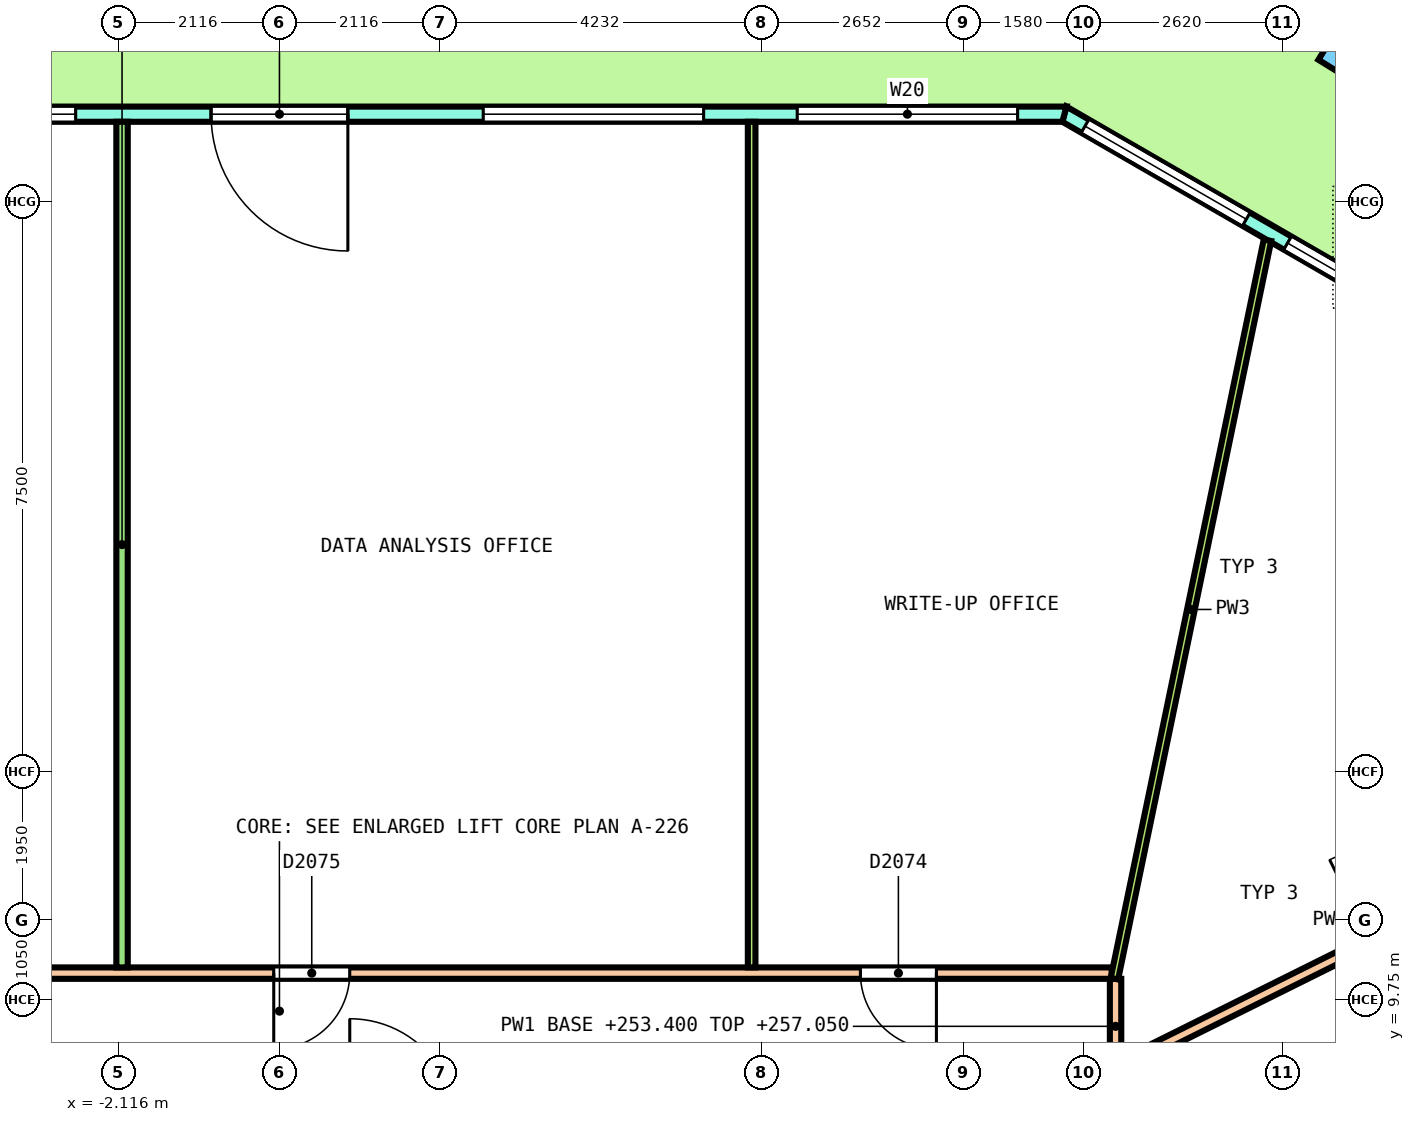
"""IFC4 building model, lengths in metres.
Left out: names, types, materials, properties, quantities, classifications, styles, units other than length and angle.
Written with IfcOpenShell. Run it as: python <this file> out.ifc"""

import sys

from ifc_helpers import new_model, si_unit, direction, frame, frame_2d, origin, origin_2d, place, context, subcontext, project, spatial, polyline, rectangle, outline, extrude, element, fill, save


model = new_model("IFC4")
c1 = context("Model", 3, precision=1e-05, world=origin(), true_north=direction((0.0, 1.0)))
c2 = subcontext(c1, "Body", "Model", "MODEL_VIEW")
j1 = project(units=[si_unit("LENGTHUNIT", "METRE"), si_unit("PLANEANGLEUNIT", "RADIAN")], contexts=[c1])
p1 = place(None, origin())
s1 = spatial("IfcSite", under=j1, at=p1, CompositionType="ELEMENT")
p2 = place(p1, origin())
s2 = spatial("IfcBuilding", under=s1, at=p2, CompositionType="ELEMENT")
p3 = place(p2, frame((0.0, 0.0, 253.4)))
s3 = spatial("IfcBuildingStorey", under=s2, at=p3, CompositionType="ELEMENT", Elevation=253.4)
p4 = place(p3, frame((14.391, 22.287, 0.0), z_axis=(-0.356050057994, 0.0, 0.934466883417), x_axis=(-0.794974235291, 0.525611228878, -0.302900645922)))
e1 = element("IfcColumn", 1, at=p4, inside=s3, PredefinedType="COLUMN", context=c2, shape_type="SweptSolid", body=[
    extrude(rectangle(XDim=1.05, YDim=1.05, at=origin_2d()), origin(), (0.0, 0.0, 1.0), 3.896),
])
p5 = place(p3, frame((15.656, 18.323, 0.0), z_axis=(0.0, 0.0, 1.0), x_axis=(-0.866029647142, 0.499992650217, 0.0)))
e2 = element("IfcWall", 2, at=p5, inside=s3, PredefinedType="SOLIDWALL", context=c2, shape_type="SweptSolid", body=[
    extrude(outline(polyline([(-0.027, -0.1), (1.008, -0.1), (2.042, -0.1), (3.076, -0.1), (4.111, -0.1), (5.145, -0.1), (6.18, -0.1), (6.126, 0.1), (5.109, 0.1), (4.093, 0.1), (3.076, 0.1), (2.06, 0.1), (1.043, 0.1), (0.027, 0.1), (-0.027, -0.1)])), origin(), (0.0, 0.0, 1.0), 3.7),
])
p6 = place(p5, frame((0.313, 0.0, 0.1)))
e3 = element("IfcOpeningElement", 3, at=p6, cuts=e2, PredefinedType="OPENING", context=c2, shape_type="SweptSolid", body=[
    extrude(rectangle(XDim=2.45, YDim=2.65, at=frame_2d((1.225, 1.325))), frame((0.0, 0.11, 0.0), z_axis=(0.0, -1.0, 0.0), x_axis=(1.0, 0.0, 0.0)), (0.0, 0.0, 1.0), 0.22),
])
p7 = place(p5, frame((3.39, 0.0, 0.1)))
e4 = element("IfcOpeningElement", 4, at=p7, cuts=e2, PredefinedType="OPENING", context=c2, shape_type="SweptSolid", body=[
    extrude(rectangle(XDim=2.45, YDim=2.65, at=frame_2d((1.225, 1.325))), frame((0.0, 0.11, 0.0), z_axis=(0.0, -1.0, 0.0), x_axis=(1.0, 0.0, 0.0)), (0.0, 0.0, 1.0), 0.22),
])
p8 = place(p3, frame((10.327, 21.4, 0.0), z_axis=(0.0, 0.0, 1.0), x_axis=(-1.0, 0.0, 0.0)))
e5 = element("IfcWall", 5, at=p8, inside=s3, PredefinedType="SOLIDWALL", context=c2, shape_type="SweptSolid", body=[
    extrude(outline(polyline([(-0.027, -0.1), (1.009, -0.1), (2.044, -0.1), (3.079, -0.1), (4.115, -0.1), (5.15, -0.1), (6.185, -0.1), (7.221, -0.1), (8.256, -0.1), (9.292, -0.1), (10.327, -0.1), (11.362, -0.1), (12.398, -0.1), (13.433, -0.1), (14.469, -0.1), (15.504, -0.1), (16.539, -0.1), (17.574, -0.1), (18.61, -0.1), (19.645, -0.1), (20.681, -0.1), (20.627, 0.1), (19.597, 0.1), (18.567, 0.1), (17.537, 0.1), (16.507, 0.1), (15.477, 0.1), (14.447, 0.1), (13.417, 0.1), (12.387, 0.1), (11.357, 0.1), (10.327, 0.1), (9.297, 0.1), (8.267, 0.1), (7.237, 0.1), (6.207, 0.1), (5.177, 0.1), (4.147, 0.1), (3.117, 0.1), (2.087, 0.1), (1.057, 0.1), (0.027, 0.1), (-0.027, -0.1)])), origin(), (0.0, 0.0, 1.0), 3.7),
])
p9 = place(p8, frame((0.615, 0.0, 0.1)))
e6 = element("IfcOpeningElement", 6, at=p9, cuts=e5, PredefinedType="OPENING", context=c2, shape_type="SweptSolid", body=[
    extrude(rectangle(XDim=2.9, YDim=2.65, at=frame_2d((1.45, 1.325))), frame((0.0, 0.11, 0.0), z_axis=(0.0, -1.0, 0.0), x_axis=(1.0, 0.0, 0.0)), (0.0, 0.0, 1.0), 0.22),
])
p10 = place(p8, frame((4.746, 0.0, 0.1)))
e7 = element("IfcOpeningElement", 7, at=p10, cuts=e5, PredefinedType="OPENING", context=c2, shape_type="SweptSolid", body=[
    extrude(rectangle(XDim=2.9, YDim=2.65, at=frame_2d((1.45, 1.325))), frame((0.0, 0.11, 0.0), z_axis=(0.0, -1.0, 0.0), x_axis=(1.0, 0.0, 0.0)), (0.0, 0.0, 1.0), 0.22),
])
p11 = place(p8, frame((9.427, 0.0, 0.0)))
e8 = element("IfcOpeningElement", 8, at=p11, cuts=e5, PredefinedType="OPENING", context=c2, shape_type="SweptSolid", body=[
    extrude(rectangle(XDim=1.8, YDim=2.4, at=frame_2d((0.9, 1.2))), frame((0.0, 0.11, 0.0), z_axis=(0.0, -1.0, 0.0), x_axis=(1.0, 0.0, 0.0)), (0.0, 0.0, 1.0), 0.22),
])
p12 = place(p8, frame((9.427, 0.0, 2.55)))
e9 = element("IfcOpeningElement", 9, at=p12, cuts=e5, PredefinedType="OPENING", context=c2, shape_type="SweptSolid", body=[
    extrude(rectangle(XDim=1.8, YDim=0.2, at=frame_2d((0.9, 0.1))), frame((0.0, 0.11, 0.0), z_axis=(0.0, -1.0, 0.0), x_axis=(1.0, 0.0, 0.0)), (0.0, 0.0, 1.0), 0.22),
])
p13 = place(p8, frame((13.008, 0.0, 0.1)))
e10 = element("IfcOpeningElement", 10, at=p13, cuts=e5, PredefinedType="OPENING", context=c2, shape_type="SweptSolid", body=[
    extrude(rectangle(XDim=2.9, YDim=2.65, at=frame_2d((1.45, 1.325))), frame((0.0, 0.11, 0.0), z_axis=(0.0, -1.0, 0.0), x_axis=(1.0, 0.0, 0.0)), (0.0, 0.0, 1.0), 0.22),
])
p14 = place(p8, frame((17.139, 0.0, 0.1)))
e11 = element("IfcOpeningElement", 11, at=p14, cuts=e5, PredefinedType="OPENING", context=c2, shape_type="SweptSolid", body=[
    extrude(rectangle(XDim=2.9, YDim=2.65, at=frame_2d((1.45, 1.325))), frame((0.0, 0.11, 0.0), z_axis=(0.0, -1.0, 0.0), x_axis=(1.0, 0.0, 0.0)), (0.0, 0.0, 1.0), 0.22),
])
p15 = place(p3, frame((11.275, 7.232, 0.0), z_axis=(0.0, 0.0, 1.0), x_axis=(0.958053835168, 0.286588291665, 0.0)))
e12 = element("IfcWall", 12, at=p15, inside=s3, PredefinedType="PARTITIONING", context=c2, shape_type="SweptSolid", body=[
    extrude(rectangle(XDim=9.496, YDim=0.15, at=frame_2d((4.748, 0.0))), origin(), (0.0, 0.0, 1.0), 2.8),
])
p16 = place(p15, frame((3.046, 0.0, 0.0)))
e13 = element("IfcOpeningElement", 13, at=p16, cuts=e12, PredefinedType="OPENING", context=c2, shape_type="SweptSolid", body=[
    extrude(rectangle(XDim=1.0, YDim=2.1, at=frame_2d((0.5, 1.05))), frame((0.0, 0.085, 0.0), z_axis=(0.0, -1.0, 0.0), x_axis=(1.0, 0.0, 0.0)), (0.0, 0.0, 1.0), 0.17),
])
p17 = place(p3, frame((11.067, 8.883, 0.0), z_axis=(0.0, 0.0, 1.0), x_axis=(0.895349636701, 0.445363927658, 0.0)))
e14 = element("IfcWall", 14, at=p17, inside=s3, PredefinedType="PARTITIONING", context=c2, shape_type="SweptSolid", body=[
    extrude(rectangle(XDim=8.61, YDim=0.15, at=frame_2d((4.305, 0.0))), origin(), (0.0, 0.0, 1.0), 2.8),
])
p18 = place(p17, frame((3.668, 0.0, 0.0)))
e15 = element("IfcOpeningElement", 15, at=p18, cuts=e14, PredefinedType="OPENING", context=c2, shape_type="SweptSolid", body=[
    extrude(rectangle(XDim=1.2, YDim=2.1, at=frame_2d((0.6, 1.05))), frame((0.0, 0.085, 0.0), z_axis=(0.0, -1.0, 0.0), x_axis=(1.0, 0.0, 0.0)), (0.0, 0.0, 1.0), 0.17),
])
p19 = place(p3, frame((11.0, 8.775, 0.0), z_axis=(0.0, 0.0, 1.0), x_axis=(0.0, 1.0, 0.0)))
e16 = element("IfcWall", 16, at=p19, inside=s3, PredefinedType="PARTITIONING", context=c2, shape_type="SweptSolid", body=[
    extrude(rectangle(XDim=1.25, YDim=0.15, at=frame_2d((0.625, 0.0))), origin(), (0.0, 0.0, 1.0), 3.65),
])
p20 = place(p3, frame((-10.925, 10.1, 0.0), z_axis=(0.0, 0.0, 1.0), x_axis=(1.0, 0.0, 0.0)))
e17 = element("IfcWall", 17, at=p20, inside=s3, PredefinedType="PARTITIONING", context=c2, shape_type="SweptSolid", body=[
    extrude(rectangle(XDim=21.875, YDim=0.15, at=frame_2d((10.938, 0.0))), origin(), (0.0, 0.0, 1.0), 2.8),
])
p21 = place(p20, frame((18.568, 0.0, 0.0)))
e18 = element("IfcOpeningElement", 18, at=p21, cuts=e17, PredefinedType="OPENING", context=c2, shape_type="SweptSolid", body=[
    extrude(rectangle(XDim=1.0, YDim=2.1, at=frame_2d((0.5, 1.05))), frame((0.0, 0.085, 0.0), z_axis=(0.0, -1.0, 0.0), x_axis=(1.0, 0.0, 0.0)), (0.0, 0.0, 1.0), 0.17),
])
p22 = place(p20, frame((10.85, 0.0, 0.0)))
e19 = element("IfcOpeningElement", 19, at=p22, cuts=e17, PredefinedType="OPENING", context=c2, shape_type="SweptSolid", body=[
    extrude(rectangle(XDim=1.0, YDim=2.1, at=frame_2d((0.5, 1.05))), frame((0.0, 0.085, 0.0), z_axis=(0.0, -1.0, 0.0), x_axis=(1.0, 0.0, 0.0)), (0.0, 0.0, 1.0), 0.17),
])
p23 = place(p20, frame((5.708, 0.0, 0.0)))
e20 = element("IfcOpeningElement", 20, at=p23, cuts=e17, PredefinedType="OPENING", context=c2, shape_type="SweptSolid", body=[
    extrude(rectangle(XDim=1.2, YDim=2.1, at=frame_2d((0.6, 1.05))), frame((0.0, 0.085, 0.0), z_axis=(0.0, -1.0, 0.0), x_axis=(1.0, 0.0, 0.0)), (0.0, 0.0, 1.0), 0.17),
])
p24 = place(p3, frame((-2.071, 10.175, 0.0), z_axis=(0.0, 0.0, 1.0), x_axis=(0.0, 1.0, 0.0)))
e21 = element("IfcWall", 21, at=p24, inside=s3, PredefinedType="PARTITIONING", context=c2, shape_type="SweptSolid", body=[
    extrude(rectangle(XDim=11.125, YDim=0.15, at=frame_2d((5.562, 0.0))), origin(), (0.0, 0.0, 1.0), 3.65),
])
p25 = place(p3, frame((10.985, 10.027, 0.0), z_axis=(0.0, 0.0, 1.0), x_axis=(0.202948951039, 0.979189319423, 0.0)))
e22 = element("IfcWall", 22, at=p25, inside=s3, PredefinedType="PARTITIONING", context=c2, shape_type="SweptSolid", body=[
    extrude(rectangle(XDim=9.922, YDim=0.1, at=frame_2d((4.961, 0.0))), origin(), (0.0, 0.0, 1.0), 2.8),
])
p26 = place(p3, frame((6.212, 10.175, 0.0), z_axis=(0.0, 0.0, 1.0), x_axis=(0.0, 1.0, 0.0)))
e23 = element("IfcWall", 23, at=p26, inside=s3, PredefinedType="PARTITIONING", context=c2, shape_type="SweptSolid", body=[
    extrude(rectangle(XDim=11.125, YDim=0.1, at=frame_2d((5.562, 0.0))), origin(), (0.0, 0.0, 1.0), 2.8),
])
p27 = place(p6, origin())
e24 = element("IfcWindow", 24, at=p27, inside=s3, PartitioningType="SINGLE_PANEL", PredefinedType="WINDOW", context=c2, shape_type="SweptSolid", body=[
    extrude(rectangle(XDim=2.45, YDim=2.65, at=frame_2d((1.225, 1.325))), frame((0.0, 0.03, 0.0), z_axis=(0.0, -1.0, 0.0), x_axis=(1.0, 0.0, 0.0)), (0.0, 0.0, 1.0), 0.06),
])
fill(e3, e24)
p28 = place(p7, origin())
e25 = element("IfcWindow", 25, at=p28, inside=s3, PartitioningType="SINGLE_PANEL", PredefinedType="WINDOW", context=c2, shape_type="SweptSolid", body=[
    extrude(rectangle(XDim=2.45, YDim=2.65, at=frame_2d((1.225, 1.325))), frame((0.0, 0.03, 0.0), z_axis=(0.0, -1.0, 0.0), x_axis=(1.0, 0.0, 0.0)), (0.0, 0.0, 1.0), 0.06),
])
fill(e4, e25)
p29 = place(p9, origin())
e26 = element("IfcWindow", 26, at=p29, inside=s3, PartitioningType="SINGLE_PANEL", PredefinedType="WINDOW", context=c2, shape_type="SweptSolid", body=[
    extrude(rectangle(XDim=2.9, YDim=2.65, at=frame_2d((1.45, 1.325))), frame((0.0, 0.03, 0.0), z_axis=(0.0, -1.0, 0.0), x_axis=(1.0, 0.0, 0.0)), (0.0, 0.0, 1.0), 0.06),
])
fill(e6, e26)
p30 = place(p10, origin())
e27 = element("IfcWindow", 27, at=p30, inside=s3, PartitioningType="SINGLE_PANEL", PredefinedType="WINDOW", context=c2, shape_type="SweptSolid", body=[
    extrude(rectangle(XDim=2.9, YDim=2.65, at=frame_2d((1.45, 1.325))), frame((0.0, 0.03, 0.0), z_axis=(0.0, -1.0, 0.0), x_axis=(1.0, 0.0, 0.0)), (0.0, 0.0, 1.0), 0.06),
])
fill(e7, e27)
p31 = place(p11, origin())
e28 = element("IfcDoor", 28, at=p31, inside=s3, OperationType="DOUBLE_DOOR_SINGLE_SWING", PredefinedType="DOOR", context=c2, shape_type="SweptSolid", body=[
    extrude(rectangle(XDim=1.8, YDim=2.4, at=frame_2d((0.9, 1.2))), frame((0.0, 0.025, 0.0), z_axis=(0.0, -1.0, 0.0), x_axis=(1.0, 0.0, 0.0)), (0.0, 0.0, 1.0), 0.05),
])
fill(e8, e28)
p32 = place(p12, origin())
e29 = element("IfcWindow", 29, at=p32, inside=s3, PartitioningType="SINGLE_PANEL", PredefinedType="WINDOW", context=c2, shape_type="SweptSolid", body=[
    extrude(rectangle(XDim=1.8, YDim=0.2, at=frame_2d((0.9, 0.1))), frame((0.0, 0.03, 0.0), z_axis=(0.0, -1.0, 0.0), x_axis=(1.0, 0.0, 0.0)), (0.0, 0.0, 1.0), 0.06),
])
fill(e9, e29)
p33 = place(p13, origin())
e30 = element("IfcWindow", 30, at=p33, inside=s3, PartitioningType="SINGLE_PANEL", PredefinedType="WINDOW", context=c2, shape_type="SweptSolid", body=[
    extrude(rectangle(XDim=2.9, YDim=2.65, at=frame_2d((1.45, 1.325))), frame((0.0, 0.03, 0.0), z_axis=(0.0, -1.0, 0.0), x_axis=(1.0, 0.0, 0.0)), (0.0, 0.0, 1.0), 0.06),
])
fill(e10, e30)
p34 = place(p21, origin())
e31 = element("IfcDoor", 31, at=p34, inside=s3, OperationType="SINGLE_SWING_RIGHT", PredefinedType="DOOR", context=c2, shape_type="SweptSolid", body=[
    extrude(rectangle(XDim=1.0, YDim=2.1, at=frame_2d((0.5, 1.05))), frame((0.0, 0.025, 0.0), z_axis=(0.0, -1.0, 0.0), x_axis=(1.0, 0.0, 0.0)), (0.0, 0.0, 1.0), 0.05),
])
fill(e18, e31)
p35 = place(p22, origin())
e32 = element("IfcDoor", 32, at=p35, inside=s3, OperationType="SINGLE_SWING_LEFT", PredefinedType="DOOR", context=c2, shape_type="SweptSolid", body=[
    extrude(rectangle(XDim=1.0, YDim=2.1, at=frame_2d((0.5, 1.05))), frame((0.0, 0.025, 0.0), z_axis=(0.0, -1.0, 0.0), x_axis=(1.0, 0.0, 0.0)), (0.0, 0.0, 1.0), 0.05),
])
fill(e19, e32)
save(model, sys.argv[1])
